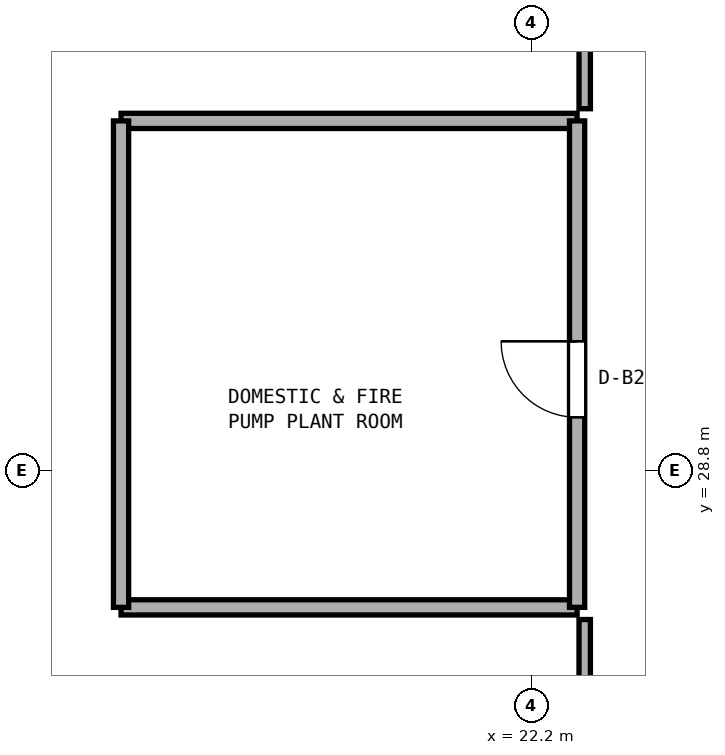
"""IFC4 building model, lengths in metres.
Left out: names, types, materials, properties, quantities, classifications, styles, units other than length and angle.
Written with IfcOpenShell. Run it as: python <this file> out.ifc"""

import sys

from ifc_helpers import new_model, si_unit, direction, frame, frame_2d, origin, place, context, subcontext, project, spatial, rectangle, extrude, element, fill, save


model = new_model("IFC4")
c1 = context("Model", 3, precision=1e-05, world=origin(), true_north=direction((0.0, 1.0)))
c2 = subcontext(c1, "Body", "Model", "MODEL_VIEW")
j1 = project(units=[si_unit("LENGTHUNIT", "METRE"), si_unit("PLANEANGLEUNIT", "RADIAN")], contexts=[c1])
p1 = place(None, origin())
s1 = spatial("IfcSite", under=j1, at=p1, CompositionType="ELEMENT")
p2 = place(p1, origin())
s2 = spatial("IfcBuilding", under=s1, at=p2, CompositionType="ELEMENT")
p3 = place(p2, frame((0.0, 0.0, -9.6)))
s3 = spatial("IfcBuildingStorey", under=s2, at=p3, CompositionType="ELEMENT", Elevation=-9.6)
for number, where, z_axis, x_axis in (
    (1, (16.8, 27.0, 0.0), (0.0, 0.0, 1.0), (1.0, 0.0, 0.0)),
    (2, (16.8, 33.4, 0.0), (0.0, 0.0, 1.0), (1.0, 0.0, 0.0)),
):
    element("IfcWall", number, at=place(p3, frame(where, z_axis=z_axis, x_axis=x_axis)), inside=s3, PredefinedType="SOLIDWALL", context=c2, shape_type="SweptSolid", body=[
        extrude(rectangle(XDim=6.0, YDim=0.2, at=frame_2d((3.0, 0.0))), origin(), (0.0, 0.0, 1.0), 4.45),
    ])
p4 = place(p3, frame((16.8, 27.0, 0.0), z_axis=(0.0, 0.0, 1.0), x_axis=(0.0, 1.0, 0.0)))
e3 = element("IfcWall", 3, at=p4, inside=s3, PredefinedType="SOLIDWALL", context=c2, shape_type="SweptSolid", body=[
    extrude(rectangle(XDim=6.4, YDim=0.2, at=frame_2d((3.2, 0.0))), origin(), (0.0, 0.0, 1.0), 4.45),
])
p5 = place(p3, frame((22.8, 27.0, 0.0), z_axis=(0.0, 0.0, 1.0), x_axis=(0.0, 1.0, 0.0)))
e4 = element("IfcWall", 4, at=p5, inside=s3, PredefinedType="SOLIDWALL", context=c2, shape_type="SweptSolid", body=[
    extrude(rectangle(XDim=6.4, YDim=0.2, at=frame_2d((3.2, 0.0))), origin(), (0.0, 0.0, 1.0), 4.45),
])
p6 = place(p5, frame((2.5, 0.0, 0.0)))
e5 = element("IfcOpeningElement", 5, at=p6, cuts=e4, PredefinedType="OPENING", context=c2, shape_type="SweptSolid", body=[
    extrude(rectangle(XDim=1.0, YDim=2.12, at=frame_2d((0.5, 1.06))), frame((0.0, 0.11, 0.0), z_axis=(0.0, -1.0, 0.0), x_axis=(1.0, 0.0, 0.0)), (0.0, 0.0, 1.0), 0.22),
])
p7 = place(p3, frame((22.9, 23.56, 0.0), z_axis=(0.0, 0.0, 1.0), x_axis=(0.0, 1.0, 0.0)))
e6 = element("IfcWall", 6, at=p7, inside=s3, PredefinedType="PARTITIONING", context=c2, shape_type="SweptSolid", body=[
    extrude(rectangle(XDim=3.28, YDim=0.15, at=frame_2d((1.64, 0.0))), origin(), (0.0, 0.0, 1.0), 4.45),
])
p8 = place(p3, frame((22.9, 33.56, 0.0), z_axis=(0.0, 0.0, 1.0), x_axis=(0.0, 1.0, 0.0)))
e7 = element("IfcWall", 7, at=p8, inside=s3, PredefinedType="PARTITIONING", context=c2, shape_type="SweptSolid", body=[
    extrude(rectangle(XDim=3.94, YDim=0.15, at=frame_2d((1.97, 0.0))), origin(), (0.0, 0.0, 1.0), 4.45),
])
p9 = place(p6, origin())
e8 = element("IfcDoor", 8, at=p9, inside=s3, OperationType="SINGLE_SWING_RIGHT", PredefinedType="DOOR", context=c2, shape_type="SweptSolid", body=[
    extrude(rectangle(XDim=1.0, YDim=2.12, at=frame_2d((0.5, 1.06))), frame((0.0, 0.025, 0.0), z_axis=(0.0, -1.0, 0.0), x_axis=(1.0, 0.0, 0.0)), (0.0, 0.0, 1.0), 0.05),
])
fill(e5, e8)
save(model, sys.argv[1])
